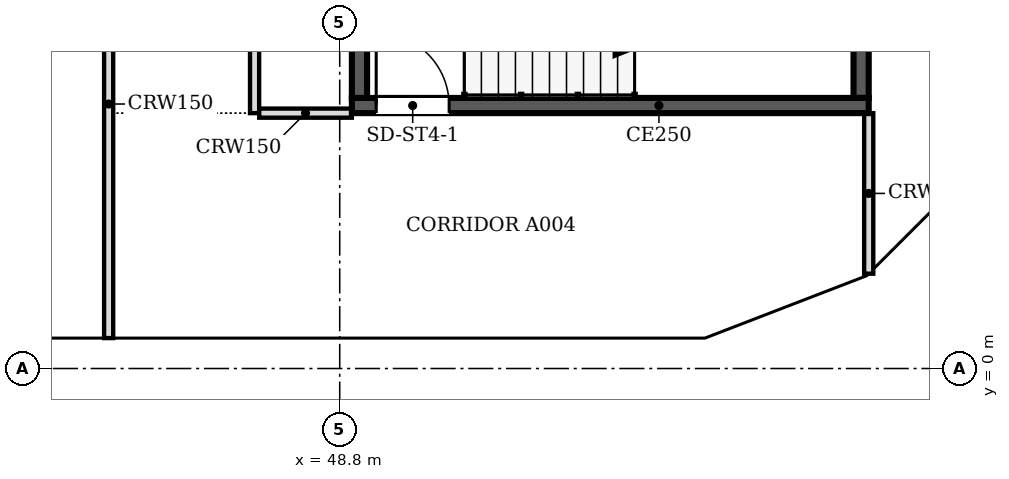
"""IFC4 building model, lengths in metres.
Left out: names, types, materials, properties, quantities, classifications, styles, units other than length and angle.
Written with IfcOpenShell. Run it as: python <this file> out.ifc"""

import sys

from ifc_helpers import new_model, si_unit, direction, frame, frame_2d, origin, place, context, subcontext, project, spatial, polyline, rectangle, outline, extrude, faceted_brep, source, transform, mapped, element, fill, save


model = new_model("IFC4")
c1 = context("Model", 3, precision=1e-05, world=origin(), true_north=direction((0.0, 1.0)))
c2 = subcontext(c1, "Body", "Model", "MODEL_VIEW")
j1 = project(units=[si_unit("LENGTHUNIT", "METRE"), si_unit("PLANEANGLEUNIT", "RADIAN")], contexts=[c1])
p1 = place(None, origin())
s1 = spatial("IfcSite", under=j1, at=p1, CompositionType="ELEMENT")
p2 = place(p1, origin())
s2 = spatial("IfcBuilding", under=s1, at=p2, CompositionType="ELEMENT")
p3 = place(p2, frame((0.0, 0.0, 37.2)))
s3 = spatial("IfcBuildingStorey", under=s2, at=p3, CompositionType="ELEMENT", Elevation=37.2)
m1 = source(origin(), c2, "Body", "SweptSolid", [
    extrude(outline(polyline([(3.05, 0.0), (6.1, 3.8), (3.05, 7.6), (0.0, 3.8), (3.05, 0.0)])), frame((0.0, 0.25, 0.0), z_axis=(0.0, -1.0, 0.0), x_axis=(1.0, 0.0, 0.0)), (0.0, 0.0, 1.0), 0.5),
])
p4 = place(p3, frame((42.7, 0.25, -3.8), z_axis=(0.0, 0.0, 1.0), x_axis=(1.0, 0.0, 0.0)))
e1 = element("IfcWall", 1, at=p4, inside=s3, PredefinedType="SOLIDWALL", context=c2, shape_type="MappedRepresentation", body=[
    mapped(m1, transform((0.0, 0.0, 0.0), scale=1.0)),
])
m2 = source(origin(), c2, "Body", "SweptSolid", [
    extrude(outline(polyline([(3.05, 0.399), (5.78, 3.8), (3.05, 7.201), (0.321, 3.8), (3.05, 0.399)])), frame((0.0, 0.26, 0.0), z_axis=(0.0, -1.0, 0.0), x_axis=(1.0, 0.0, 0.0)), (0.0, 0.0, 1.0), 0.52),
])
p5 = place(p4, origin())
e2 = element("IfcOpeningElement", 2, at=p5, cuts=e1, PredefinedType="OPENING", context=c2, shape_type="MappedRepresentation", body=[
    mapped(m2, transform((0.0, 0.0, 0.0), scale=1.0)),
])
m3 = source(origin(), c2, "Body", "Brep", [
    faceted_brep([(3.05, -0.25, 0.0), (6.053, -0.25, 3.8), (3.05, -0.25, 7.6), (0.0, -0.25, 3.8), (0.0, 0.25, 3.8), (3.05, 0.25, 7.6), (6.007, 0.25, 3.859), (6.007, 0.25, 3.741), (3.05, 0.25, 0.0), (6.053, 0.0, 3.8)], [[[0, 1, 2, 3]], [[4, 5, 6, 7, 8]], [[8, 7, 9, 1, 0]], [[6, 5, 2, 1, 9]], [[5, 4, 3, 2]], [[4, 8, 0, 3]], [[9, 7, 6]]]),
])
p6 = place(p3, frame((48.8, 0.25, -3.8), z_axis=(0.0, 0.0, 1.0), x_axis=(1.0, 0.0, 0.0)))
e3 = element("IfcWall", 3, at=p6, inside=s3, PredefinedType="SOLIDWALL", context=c2, shape_type="MappedRepresentation", body=[
    mapped(m3, transform((0.0, 0.0, 0.0), scale=1.0)),
])
m4 = source(origin(), c2, "Body", "SweptSolid", [
    extrude(outline(polyline([(3.049, 0.401), (5.735, 3.8), (3.049, 7.199), (0.321, 3.8), (3.049, 0.401)])), frame((0.0, 0.26, 0.0), z_axis=(0.0, -1.0, 0.0), x_axis=(1.0, 0.0, 0.0)), (0.0, 0.0, 1.0), 0.52),
])
p7 = place(p6, origin())
e4 = element("IfcOpeningElement", 4, at=p7, cuts=e3, PredefinedType="OPENING", context=c2, shape_type="MappedRepresentation", body=[
    mapped(m4, transform((0.0, 0.0, 0.0), scale=1.0)),
])
m5 = source(origin(), c2, "Body", "Brep", [
    faceted_brep([(2.95, -0.25, 0.0), (3.003, -0.25, 0.068), (3.003, -0.25, 7.532), (2.95, -0.25, 7.6), (0.0, -0.25, 3.8), (0.047, 0.25, 3.86), (2.898, 0.25, 7.532), (2.898, 0.25, 0.068), (0.047, 0.25, 3.74), (2.95, 0.0, 0.0), (2.95, 0.0, 7.6), (0.0, 0.0, 3.8)], [[[0, 1, 2, 3, 4]], [[5, 6, 7, 8]], [[1, 0, 9]], [[10, 3, 2]], [[6, 5, 11, 4, 3, 10]], [[8, 7, 9, 0, 4, 11]], [[8, 11, 5]], [[1, 9, 7, 6, 10, 2]]]),
])
p8 = place(p3, frame((54.854, 0.25, -3.8), z_axis=(0.0, 0.0, 1.0), x_axis=(0.932970071518, 0.359953949349, 0.0)))
e5 = element("IfcWall", 5, at=p8, inside=s3, PredefinedType="SOLIDWALL", context=c2, shape_type="MappedRepresentation", body=[
    mapped(m5, transform((0.0, 0.0, 0.0), scale=1.0)),
])
m6 = source(origin(), c2, "Body", "SweptSolid", [
    extrude(outline(polyline([(2.75, 6.935), (0.316, 3.8), (2.75, 0.665), (2.75, 6.935)])), frame((0.0, 0.26, 0.0), z_axis=(0.0, -1.0, 0.0), x_axis=(1.0, 0.0, 0.0)), (0.0, 0.0, 1.0), 0.52),
])
p9 = place(p8, origin())
e6 = element("IfcOpeningElement", 6, at=p9, cuts=e5, PredefinedType="OPENING", context=c2, shape_type="MappedRepresentation", body=[
    mapped(m6, transform((0.0, 0.0, 0.0), scale=1.0)),
])
m7 = source(origin(), c2, "Body", "Brep", [
    faceted_brep([(0.053, -0.25, 0.0), (2.997, -0.25, 3.8), (0.053, -0.25, 7.6), (0.0, -0.25, 7.532), (0.0, -0.25, 0.068), (0.106, 0.25, 7.532), (2.944, 0.25, 3.868), (2.944, 0.25, 3.732), (0.106, 0.25, 0.068), (2.997, 0.0, 3.8), (0.053, 0.0, 0.0), (0.053, 0.0, 7.6)], [[[0, 1, 2, 3, 4]], [[5, 6, 7, 8]], [[8, 7, 9, 1, 0, 10]], [[6, 5, 11, 2, 1, 9]], [[3, 2, 11]], [[10, 0, 4]], [[8, 10, 4, 3, 11, 5]], [[9, 7, 6]]]),
])
p10 = place(p3, frame((57.569, 1.274, -3.8), z_axis=(0.0, 0.0, 1.0), x_axis=(0.707066050402, 0.707147509625, 0.0)))
e7 = element("IfcWall", 7, at=p10, inside=s3, PredefinedType="SOLIDWALL", context=c2, shape_type="MappedRepresentation", body=[
    mapped(m7, transform((0.0, 0.0, 0.0), scale=1.0)),
])
m8 = source(origin(), c2, "Body", "SweptSolid", [
    extrude(outline(polyline([(0.253, 0.667), (2.681, 3.8), (0.253, 6.934), (0.253, 0.667)])), frame((0.0, 0.26, 0.0), z_axis=(0.0, -1.0, 0.0), x_axis=(1.0, 0.0, 0.0)), (0.0, 0.0, 1.0), 0.52),
])
p11 = place(p10, origin())
e8 = element("IfcOpeningElement", 8, at=p11, cuts=e7, PredefinedType="OPENING", context=c2, shape_type="MappedRepresentation", body=[
    mapped(m8, transform((0.0, 0.0, 0.0), scale=1.0)),
])
p12 = place(p2, frame((0.0, 0.0, 41.0)))
s4 = spatial("IfcBuildingStorey", under=s2, at=p12, CompositionType="ELEMENT", Elevation=41.0)
p13 = place(p12, frame((39.65, 0.25, -3.8), z_axis=(0.0, 0.0, 1.0), x_axis=(1.0, 0.0, 0.0)))
e9 = element("IfcWall", 9, at=p13, inside=s4, PredefinedType="SOLIDWALL", context=c2, shape_type="MappedRepresentation", body=[
    mapped(m1, transform((0.0, 0.0, 0.0), scale=1.0)),
])
p14 = place(p13, origin())
e10 = element("IfcOpeningElement", 10, at=p14, cuts=e9, PredefinedType="OPENING", context=c2, shape_type="MappedRepresentation", body=[
    mapped(m2, transform((0.0, 0.0, 0.0), scale=1.0)),
])
p15 = place(p12, frame((45.75, 0.25, -3.8), z_axis=(0.0, 0.0, 1.0), x_axis=(1.0, 0.0, 0.0)))
e11 = element("IfcWall", 11, at=p15, inside=s4, PredefinedType="SOLIDWALL", context=c2, shape_type="MappedRepresentation", body=[
    mapped(m1, transform((0.0, 0.0, 0.0), scale=1.0)),
])
p16 = place(p15, origin())
e12 = element("IfcOpeningElement", 12, at=p16, cuts=e11, PredefinedType="OPENING", context=c2, shape_type="MappedRepresentation", body=[
    mapped(m2, transform((0.0, 0.0, 0.0), scale=1.0)),
])
m9 = source(origin(), c2, "Body", "Brep", [
    faceted_brep([(3.003, -0.25, 0.0), (3.05, -0.25, 0.06), (3.05, -0.25, 7.54), (3.003, -0.25, 7.6), (0.0, -0.25, 3.8), (0.0, 0.25, 3.8), (2.957, 0.25, 7.541), (2.957, 0.25, 0.059), (3.003, 0.0, 0.0), (3.003, 0.0, 7.6)], [[[0, 1, 2, 3, 4]], [[5, 6, 7]], [[1, 0, 8]], [[9, 3, 2]], [[6, 5, 4, 3, 9]], [[5, 7, 8, 0, 4]], [[1, 8, 7, 6, 9, 2]]]),
])
p17 = place(p12, frame((51.85, 0.25, -3.8), z_axis=(0.0, 0.0, 1.0), x_axis=(1.0, 0.0, 0.0)))
e13 = element("IfcWall", 13, at=p17, inside=s4, PredefinedType="SOLIDWALL", context=c2, shape_type="MappedRepresentation", body=[
    mapped(m9, transform((0.0, 0.0, 0.0), scale=1.0)),
])
m10 = source(origin(), c2, "Body", "SweptSolid", [
    extrude(outline(polyline([(2.803, 6.944), (0.319, 3.8), (2.803, 0.656), (2.803, 6.944)])), frame((0.0, 0.26, 0.0), z_axis=(0.0, -1.0, 0.0), x_axis=(1.0, 0.0, 0.0)), (0.0, 0.0, 1.0), 0.52),
])
p18 = place(p17, origin())
e14 = element("IfcOpeningElement", 14, at=p18, cuts=e13, PredefinedType="OPENING", context=c2, shape_type="MappedRepresentation", body=[
    mapped(m10, transform((0.0, 0.0, 0.0), scale=1.0)),
])
m11 = source(origin(), c2, "Body", "Brep", [
    faceted_brep([(0.047, -0.25, 0.0), (2.997, -0.25, 3.8), (0.047, -0.25, 7.6), (0.0, -0.25, 7.541), (0.0, -0.25, 0.059), (0.093, 0.25, 7.54), (2.944, 0.25, 3.868), (2.944, 0.25, 3.732), (0.093, 0.25, 0.06), (2.997, 0.0, 3.8), (0.047, 0.0, 0.0), (0.047, 0.0, 7.6)], [[[0, 1, 2, 3, 4]], [[5, 6, 7, 8]], [[8, 7, 9, 1, 0, 10]], [[6, 5, 11, 2, 1, 9]], [[3, 2, 11]], [[10, 0, 4]], [[8, 10, 4, 3, 11, 5]], [[9, 7, 6]]]),
])
p19 = place(p12, frame((54.81, 0.233, -3.8), z_axis=(0.0, 0.0, 1.0), x_axis=(0.932990326376, 0.359901446078, 0.0)))
e15 = element("IfcWall", 15, at=p19, inside=s4, PredefinedType="SOLIDWALL", context=c2, shape_type="MappedRepresentation", body=[
    mapped(m11, transform((0.0, 0.0, 0.0), scale=1.0)),
])
m12 = source(origin(), c2, "Body", "SweptSolid", [
    extrude(outline(polyline([(0.247, 0.665), (2.681, 3.8), (0.247, 6.935), (0.247, 0.665)])), frame((0.0, 0.26, 0.0), z_axis=(0.0, -1.0, 0.0), x_axis=(1.0, 0.0, 0.0)), (0.0, 0.0, 1.0), 0.52),
])
p20 = place(p19, origin())
e16 = element("IfcOpeningElement", 16, at=p20, cuts=e15, PredefinedType="OPENING", context=c2, shape_type="MappedRepresentation", body=[
    mapped(m12, transform((0.0, 0.0, 0.0), scale=1.0)),
])
m13 = source(origin(), c2, "Body", "Brep", [
    faceted_brep([(2.944, -0.25, 0.0), (2.997, -0.25, 0.068), (2.997, -0.25, 7.532), (2.944, -0.25, 7.6), (0.0, -0.25, 3.8), (0.053, 0.25, 3.868), (2.891, 0.25, 7.532), (2.891, 0.25, 0.068), (0.053, 0.25, 3.732), (2.944, 0.0, 0.0), (2.944, 0.0, 7.6), (0.0, 0.0, 3.8)], [[[0, 1, 2, 3, 4]], [[5, 6, 7, 8]], [[1, 0, 9]], [[10, 3, 2]], [[6, 5, 11, 4, 3, 10]], [[8, 7, 9, 0, 4, 11]], [[8, 11, 5]], [[1, 9, 7, 6, 10, 2]]]),
])
p21 = place(p12, frame((57.606, 1.312, -3.8), z_axis=(0.0, 0.0, 1.0), x_axis=(0.707147509625, 0.707066050402, 0.0)))
e17 = element("IfcWall", 17, at=p21, inside=s4, PredefinedType="SOLIDWALL", context=c2, shape_type="MappedRepresentation", body=[
    mapped(m13, transform((0.0, 0.0, 0.0), scale=1.0)),
])
m14 = source(origin(), c2, "Body", "SweptSolid", [
    extrude(outline(polyline([(2.744, 6.934), (0.316, 3.8), (2.744, 0.666), (2.744, 6.934)])), frame((0.0, 0.26, 0.0), z_axis=(0.0, -1.0, 0.0), x_axis=(1.0, 0.0, 0.0)), (0.0, 0.0, 1.0), 0.52),
])
p22 = place(p21, origin())
e18 = element("IfcOpeningElement", 18, at=p22, cuts=e17, PredefinedType="OPENING", context=c2, shape_type="MappedRepresentation", body=[
    mapped(m14, transform((0.0, 0.0, 0.0), scale=1.0)),
])
p23 = place(p3, frame((57.5, 4.325, 0.0), z_axis=(0.0, 0.0, 1.0), x_axis=(-1.0, 0.0, 0.0)))
e19 = element("IfcWall", 19, at=p23, inside=s3, PredefinedType="SOLIDWALL", context=c2, shape_type="SweptSolid", body=[
    extrude(rectangle(XDim=8.5, YDim=0.25, at=frame_2d((4.25, 0.0))), origin(), (0.0, 0.0, 1.0), 3.8),
])
m15 = source(origin(), c2, "Body", "SweptSolid", [
    extrude(rectangle(XDim=1.2, YDim=2.1, at=frame_2d((0.6, 1.05))), frame((0.0, 0.135, 0.0), z_axis=(0.0, -1.0, 0.0), x_axis=(1.0, 0.0, 0.0)), (0.0, 0.0, 1.0), 0.27),
])
p24 = place(p23, frame((6.9, 0.0, 0.0)))
e20 = element("IfcOpeningElement", 20, at=p24, cuts=e19, PredefinedType="OPENING", context=c2, shape_type="MappedRepresentation", body=[
    mapped(m15, transform((0.0, 0.0, 0.0), scale=1.0)),
])
for number, where, z_axis, x_axis in (
    (21, (49.125, 4.45, 0.0), (0.0, 0.0, 1.0), (0.0, 1.0, 0.0)),
    (22, (57.375, 7.85, 0.0), (0.0, 0.0, 1.0), (0.0, -1.0, 0.0)),
):
    element("IfcWall", number, at=place(p3, frame(where, z_axis=z_axis, x_axis=x_axis)), inside=s3, PredefinedType="SOLIDWALL", context=c2, shape_type="SweptSolid", body=[
        extrude(rectangle(XDim=3.4, YDim=0.25, at=frame_2d((1.7, 0.0))), origin(), (0.0, 0.0, 1.0), 3.8),
    ])
p25 = place(p3, frame((45.0, 0.5, 0.0), z_axis=(0.0, 0.0, 1.0), x_axis=(0.0, 1.0, 0.0)))
e23 = element("IfcWall", 23, at=p25, inside=s3, PredefinedType="PARTITIONING", context=c2, shape_type="SweptSolid", body=[
    extrude(rectangle(XDim=21.724, YDim=0.15, at=frame_2d((10.862, 0.0))), origin(), (0.0, 0.0, 1.0), 3.067),
])
m16 = source(origin(), c2, "Body", "SweptSolid", [
    extrude(rectangle(XDim=1.0, YDim=2.1, at=frame_2d((0.5, 1.05))), frame((0.0, 0.085, 0.0), z_axis=(0.0, -1.0, 0.0), x_axis=(1.0, 0.0, 0.0)), (0.0, 0.0, 1.0), 0.17),
])
p26 = place(p25, frame((15.001, 0.0, 0.0)))
e24 = element("IfcOpeningElement", 24, at=p26, cuts=e23, PredefinedType="OPENING", context=c2, shape_type="MappedRepresentation", body=[
    mapped(m16, transform((0.0, 0.0, 0.0), scale=1.0)),
])
p27 = place(p25, frame((7.7, 0.0, 0.0)))
e25 = element("IfcOpeningElement", 25, at=p27, cuts=e23, PredefinedType="OPENING", context=c2, shape_type="MappedRepresentation", body=[
    mapped(m16, transform((0.0, 0.0, 0.0), scale=1.0)),
])
p28 = place(p3, frame((57.5, 1.559, 0.0), z_axis=(0.0, 0.0, 1.0), x_axis=(0.0, 1.0, 0.0)))
e26 = element("IfcWall", 26, at=p28, inside=s3, PredefinedType="PARTITIONING", context=c2, shape_type="SweptSolid", body=[
    extrude(rectangle(XDim=2.641, YDim=0.15, at=frame_2d((1.32, 0.0))), origin(), (0.0, 0.0, 1.0), 3.067),
])
p29 = place(p3, frame((47.4, 22.224, 0.0), z_axis=(0.0, 0.0, 1.0), x_axis=(0.0, -1.0, 0.0)))
e27 = element("IfcWall", 27, at=p29, inside=s3, PredefinedType="PARTITIONING", context=c2, shape_type="SweptSolid", body=[
    extrude(rectangle(XDim=18.024, YDim=0.15, at=frame_2d((9.012, 0.0))), origin(), (0.0, 0.0, 1.0), 3.067),
])
m17 = source(origin(), c2, "Body", "SweptSolid", [
    extrude(rectangle(XDim=0.9, YDim=2.1, at=frame_2d((0.45, 1.05))), frame((0.0, 0.085, 0.0), z_axis=(0.0, -1.0, 0.0), x_axis=(1.0, 0.0, 0.0)), (0.0, 0.0, 1.0), 0.17),
])
p30 = place(p29, frame((3.623, 0.0, 0.0)))
e28 = element("IfcOpeningElement", 28, at=p30, cuts=e27, PredefinedType="OPENING", context=c2, shape_type="MappedRepresentation", body=[
    mapped(m17, transform((0.0, 0.0, 0.0), scale=1.0)),
])
p31 = place(p29, frame((12.624, 0.0, 0.0)))
e29 = element("IfcOpeningElement", 29, at=p31, cuts=e27, PredefinedType="OPENING", context=c2, shape_type="MappedRepresentation", body=[
    mapped(m17, transform((0.0, 0.0, 0.0), scale=1.0)),
])
p32 = place(p3, frame((47.476, 4.2, 0.0), z_axis=(0.0, 0.0, 1.0), x_axis=(1.0, 0.0, 0.0)))
e30 = element("IfcWall", 30, at=p32, inside=s3, PredefinedType="PARTITIONING", context=c2, shape_type="SweptSolid", body=[
    extrude(rectangle(XDim=1.524, YDim=0.15, at=frame_2d((0.762, 0.0))), origin(), (0.0, 0.0, 1.0), 3.067),
])
m18 = source(origin(), c2, "Body", "SweptSolid", [
    extrude(rectangle(XDim=1.2, YDim=2.1, at=frame_2d((0.6, 1.05))), frame((0.0, 0.025, 0.0), z_axis=(0.0, -1.0, 0.0), x_axis=(1.0, 0.0, 0.0)), (0.0, 0.0, 1.0), 0.05),
])
p33 = place(p24, origin())
e31 = element("IfcDoor", 31, at=p33, inside=s3, OperationType="SINGLE_SWING_RIGHT", PredefinedType="DOOR", context=c2, shape_type="MappedRepresentation", body=[
    mapped(m18, transform((0.0, 0.0, 0.0), scale=1.0)),
])
fill(e20, e31)
save(model, sys.argv[1])
